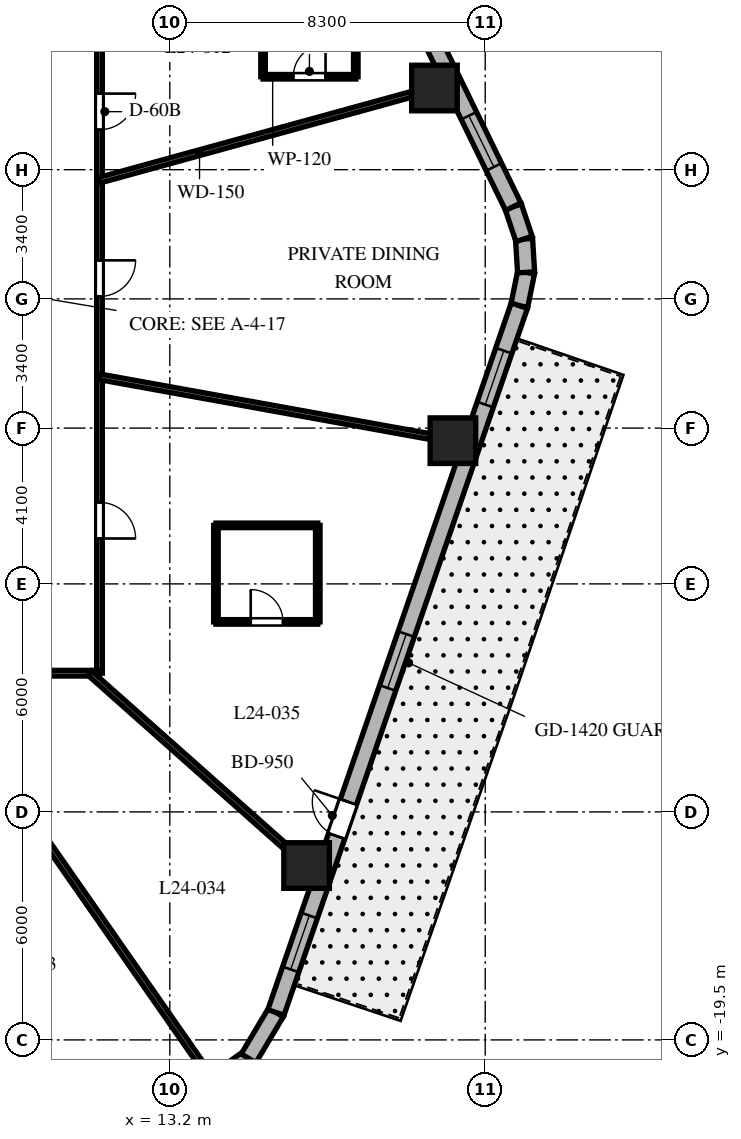
"""IFC4 building model, lengths in metres.
Left out: names, types, materials, properties, quantities, classifications, styles, units other than length and angle.
Written with IfcOpenShell. Run it as: python <this file> out.ifc"""

import sys

from ifc_helpers import new_model, si_unit, direction, frame, frame_2d, origin, origin_2d, place, context, subcontext, project, spatial, rectangle, extrude, element, fill, save


model = new_model("IFC4")
c1 = context("Model", 3, precision=1e-05, world=origin(), true_north=direction((0.0, 1.0)))
c2 = subcontext(c1, "Body", "Model", "MODEL_VIEW")
j1 = project(units=[si_unit("LENGTHUNIT", "METRE"), si_unit("PLANEANGLEUNIT", "RADIAN")], contexts=[c1])
p1 = place(None, origin())
s1 = spatial("IfcSite", under=j1, at=p1, CompositionType="ELEMENT")
p2 = place(p1, origin())
s2 = spatial("IfcBuilding", under=s1, at=p2, CompositionType="ELEMENT")
p3 = place(p2, frame((0.0, 0.0, 102.5)))
s3 = spatial("IfcBuildingStorey", under=s2, at=p3, CompositionType="ELEMENT", Elevation=102.5)
for number, where, z_axis, x_axis in (
    (1, (16.8, -14.911, 0.0), (0.0, 0.0, 1.0), (1.0, 0.0, 0.0)),
    (2, (20.65, -3.731, 0.0), (0.0, 0.0, 1.0), (1.0, 0.0, 0.0)),
    (3, (20.164, 5.549, 0.0), (0.0, 0.0, 1.0), (1.0, 0.0, 0.0)),
):
    element("IfcColumn", number, at=place(p3, frame(where, z_axis=z_axis, x_axis=x_axis)), inside=s3, PredefinedType="COLUMN", context=c2, shape_type="SweptSolid", body=[
        extrude(rectangle(XDim=1.2, YDim=1.2, at=origin_2d()), origin(), (0.0, 0.0, 1.0), 3.7),
    ])
p4 = place(p3, frame((14.146, -20.787, 0.0), z_axis=(0.0, 0.0, 1.0), x_axis=(0.814162929117, 0.580636482536, 0.0)))
e4 = element("IfcWall", 4, at=p4, inside=s3, PredefinedType="SOLIDWALL", context=c2, shape_type="SweptSolid", body=[
    extrude(rectangle(XDim=1.382, YDim=0.45, at=frame_2d((0.691, 0.0))), origin(), (0.0, 0.0, 1.0), 3.4),
])
p5 = place(p3, frame((15.272, -19.984, 0.0), z_axis=(0.0, 0.0, 1.0), x_axis=(0.512579347361, 0.858639862025, 0.0)))
e5 = element("IfcWall", 5, at=p5, inside=s3, PredefinedType="SOLIDWALL", context=c2, shape_type="SweptSolid", body=[
    extrude(rectangle(XDim=1.406, YDim=0.45, at=frame_2d((0.703, 0.0))), origin(), (0.0, 0.0, 1.0), 3.4),
])
p6 = place(p3, frame((22.397, -0.179, 0.0), z_axis=(0.0, 0.0, 1.0), x_axis=(0.199313589404, 0.979935759669, 0.0)))
e6 = element("IfcWall", 6, at=p6, inside=s3, PredefinedType="SOLIDWALL", context=c2, shape_type="SweptSolid", body=[
    extrude(rectangle(XDim=0.896, YDim=0.45, at=frame_2d((0.448, 0.0))), origin(), (0.0, 0.0, 1.0), 3.4),
])
p7 = place(p3, frame((22.575, 0.698, 0.0), z_axis=(0.0, 0.0, 1.0), x_axis=(-0.060980441946, 0.998138961117, 0.0)))
e7 = element("IfcWall", 7, at=p7, inside=s3, PredefinedType="SOLIDWALL", context=c2, shape_type="SweptSolid", body=[
    extrude(rectangle(XDim=0.881, YDim=0.45, at=frame_2d((0.44, 0.0))), origin(), (0.0, 0.0, 1.0), 3.4),
])
p8 = place(p3, frame((22.522, 1.577, 0.0), z_axis=(0.0, 0.0, 1.0), x_axis=(-0.317372694837, 0.948300887151, 0.0)))
e8 = element("IfcWall", 8, at=p8, inside=s3, PredefinedType="SOLIDWALL", context=c2, shape_type="SweptSolid", body=[
    extrude(rectangle(XDim=0.896, YDim=0.45, at=frame_2d((0.448, 0.0))), origin(), (0.0, 0.0, 1.0), 3.4),
])
p9 = place(p3, frame((15.992, -18.777, 0.0), z_axis=(0.0, 0.0, 1.0), x_axis=(0.325606988926, 0.945505202927, 0.0)))
e9 = element("IfcWall", 9, at=p9, inside=s3, PredefinedType="SOLIDWALL", context=c2, shape_type="SweptSolid", body=[
    extrude(rectangle(XDim=19.669, YDim=0.45, at=frame_2d((9.835, 0.0))), origin(), (0.0, 0.0, 1.0), 3.4),
])
p10 = place(p9, frame((4.909, 0.0, 0.0)))
e10 = element("IfcOpeningElement", 10, at=p10, cuts=e9, PredefinedType="OPENING", context=c2, shape_type="SweptSolid", body=[
    extrude(rectangle(XDim=0.95, YDim=2.15, at=frame_2d((0.475, 1.075))), frame((0.0, 0.235, 0.0), z_axis=(0.0, -1.0, 0.0), x_axis=(1.0, 0.0, 0.0)), (0.0, 0.0, 1.0), 0.47),
])
p11 = place(p9, frame((1.197, 0.0, 0.8)))
e11 = element("IfcOpeningElement", 11, at=p11, cuts=e9, PredefinedType="OPENING", context=c2, shape_type="SweptSolid", body=[
    extrude(rectangle(XDim=1.5, YDim=1.8, at=frame_2d((0.75, 0.9))), frame((0.0, 0.235, 0.0), z_axis=(0.0, -1.0, 0.0), x_axis=(1.0, 0.0, 0.0)), (0.0, 0.0, 1.0), 0.47),
])
p12 = place(p9, frame((9.03, 0.0, 0.8)))
e12 = element("IfcOpeningElement", 12, at=p12, cuts=e9, PredefinedType="OPENING", context=c2, shape_type="SweptSolid", body=[
    extrude(rectangle(XDim=1.5, YDim=1.8, at=frame_2d((0.75, 0.9))), frame((0.0, 0.235, 0.0), z_axis=(0.0, -1.0, 0.0), x_axis=(1.0, 0.0, 0.0)), (0.0, 0.0, 1.0), 0.47),
])
p13 = place(p9, frame((16.918, 0.0, 0.8)))
e13 = element("IfcOpeningElement", 13, at=p13, cuts=e9, PredefinedType="OPENING", context=c2, shape_type="SweptSolid", body=[
    extrude(rectangle(XDim=1.5, YDim=1.8, at=frame_2d((0.75, 0.9))), frame((0.0, 0.235, 0.0), z_axis=(0.0, -1.0, 0.0), x_axis=(1.0, 0.0, 0.0)), (0.0, 0.0, 1.0), 0.47),
])
p14 = place(p3, frame((22.238, 2.427, 0.0), z_axis=(0.0, 0.0, 1.0), x_axis=(-0.438374803278, 0.898792262901, 0.0)))
e14 = element("IfcWall", 14, at=p14, inside=s3, PredefinedType="SOLIDWALL", context=c2, shape_type="SweptSolid", body=[
    extrude(rectangle(XDim=18.618, YDim=0.45, at=frame_2d((9.309, 0.0))), origin(), (0.0, 0.0, 1.0), 3.4),
])
p15 = place(p14, frame((5.926, 0.0, 0.8)))
e15 = element("IfcOpeningElement", 15, at=p15, cuts=e14, PredefinedType="OPENING", context=c2, shape_type="SweptSolid", body=[
    extrude(rectangle(XDim=1.5, YDim=1.8, at=frame_2d((0.75, 0.9))), frame((0.0, 0.235, 0.0), z_axis=(0.0, -1.0, 0.0), x_axis=(1.0, 0.0, 0.0)), (0.0, 0.0, 1.0), 0.47),
])
p16 = place(p14, frame((11.165, 0.0, 0.8)))
e16 = element("IfcOpeningElement", 16, at=p16, cuts=e14, PredefinedType="OPENING", context=c2, shape_type="SweptSolid", body=[
    extrude(rectangle(XDim=1.5, YDim=1.8, at=frame_2d((0.75, 0.9))), frame((0.0, 0.235, 0.0), z_axis=(0.0, -1.0, 0.0), x_axis=(1.0, 0.0, 0.0)), (0.0, 0.0, 1.0), 0.47),
])
p17 = place(p14, frame((16.006, 0.0, 0.8)))
e17 = element("IfcOpeningElement", 17, at=p17, cuts=e14, PredefinedType="OPENING", context=c2, shape_type="SweptSolid", body=[
    extrude(rectangle(XDim=1.5, YDim=1.8, at=frame_2d((0.75, 0.9))), frame((0.0, 0.235, 0.0), z_axis=(0.0, -1.0, 0.0), x_axis=(1.0, 0.0, 0.0)), (0.0, 0.0, 1.0), 0.47),
])
p18 = place(p14, frame((1.163, 0.0, 0.8)))
e18 = element("IfcOpeningElement", 18, at=p18, cuts=e14, PredefinedType="OPENING", context=c2, shape_type="SweptSolid", body=[
    extrude(rectangle(XDim=1.5, YDim=1.8, at=frame_2d((0.75, 0.9))), frame((0.0, 0.235, 0.0), z_axis=(0.0, -1.0, 0.0), x_axis=(1.0, 0.0, 0.0)), (0.0, 0.0, 1.0), 0.47),
])
p19 = place(p3, frame((11.35, 9.85, 0.0), z_axis=(0.0, 0.0, 1.0), x_axis=(0.0, -1.0, 0.0)))
e19 = element("IfcWall", 19, at=p19, inside=s3, PredefinedType="PARTITIONING", context=c2, shape_type="SweptSolid", body=[
    extrude(rectangle(XDim=19.7, YDim=0.15, at=frame_2d((9.85, 0.0))), origin(), (0.0, 0.0, 1.0), 2.84),
])
p20 = place(p19, frame((4.448, 0.0, 0.0)))
e20 = element("IfcOpeningElement", 20, at=p20, cuts=e19, PredefinedType="OPENING", context=c2, shape_type="SweptSolid", body=[
    extrude(rectangle(XDim=0.95, YDim=2.03, at=frame_2d((0.475, 1.015))), frame((0.0, 0.085, 0.0), z_axis=(0.0, -1.0, 0.0), x_axis=(1.0, 0.0, 0.0)), (0.0, 0.0, 1.0), 0.17),
])
p21 = place(p19, frame((1.249, 0.0, 0.0)))
e21 = element("IfcOpeningElement", 21, at=p21, cuts=e19, PredefinedType="OPENING", context=c2, shape_type="SweptSolid", body=[
    extrude(rectangle(XDim=0.9, YDim=2.03, at=frame_2d((0.45, 1.015))), frame((0.0, 0.085, 0.0), z_axis=(0.0, -1.0, 0.0), x_axis=(1.0, 0.0, 0.0)), (0.0, 0.0, 1.0), 0.17),
])
p22 = place(p19, frame((15.205, 0.0, 0.0)))
e22 = element("IfcOpeningElement", 22, at=p22, cuts=e19, PredefinedType="OPENING", context=c2, shape_type="SweptSolid", body=[
    extrude(rectangle(XDim=0.95, YDim=2.03, at=frame_2d((0.475, 1.015))), frame((0.0, 0.085, 0.0), z_axis=(0.0, -1.0, 0.0), x_axis=(1.0, 0.0, 0.0)), (0.0, 0.0, 1.0), 0.17),
])
p23 = place(p19, frame((8.836, 0.0, 0.0)))
e23 = element("IfcOpeningElement", 23, at=p23, cuts=e19, PredefinedType="OPENING", context=c2, shape_type="SweptSolid", body=[
    extrude(rectangle(XDim=0.95, YDim=2.03, at=frame_2d((0.475, 1.015))), frame((0.0, 0.085, 0.0), z_axis=(0.0, -1.0, 0.0), x_axis=(1.0, 0.0, 0.0)), (0.0, 0.0, 1.0), 0.17),
])
p24 = place(p3, frame((11.35, -9.85, 0.0), z_axis=(0.0, 0.0, 1.0), x_axis=(-1.0, 0.0, 0.0)))
e24 = element("IfcWall", 24, at=p24, inside=s3, PredefinedType="PARTITIONING", context=c2, shape_type="SweptSolid", body=[
    extrude(rectangle(XDim=22.7, YDim=0.15, at=frame_2d((11.35, 0.0))), origin(), (0.0, 0.0, 1.0), 2.84),
])
p25 = place(p24, frame((17.237, 0.0, 0.0)))
e25 = element("IfcOpeningElement", 25, at=p25, cuts=e24, PredefinedType="OPENING", context=c2, shape_type="SweptSolid", body=[
    extrude(rectangle(XDim=0.95, YDim=2.03, at=frame_2d((0.475, 1.015))), frame((0.0, 0.085, 0.0), z_axis=(0.0, -1.0, 0.0), x_axis=(1.0, 0.0, 0.0)), (0.0, 0.0, 1.0), 0.17),
])
p26 = place(p24, frame((12.39, 0.0, 0.0)))
e26 = element("IfcOpeningElement", 26, at=p26, cuts=e24, PredefinedType="OPENING", context=c2, shape_type="SweptSolid", body=[
    extrude(rectangle(XDim=0.95, YDim=2.03, at=frame_2d((0.475, 1.015))), frame((0.0, 0.085, 0.0), z_axis=(0.0, -1.0, 0.0), x_axis=(1.0, 0.0, 0.0)), (0.0, 0.0, 1.0), 0.17),
])
p27 = place(p24, frame((8.954, 0.0, 0.0)))
e27 = element("IfcOpeningElement", 27, at=p27, cuts=e24, PredefinedType="OPENING", context=c2, shape_type="SweptSolid", body=[
    extrude(rectangle(XDim=0.95, YDim=2.03, at=frame_2d((0.475, 1.015))), frame((0.0, 0.085, 0.0), z_axis=(0.0, -1.0, 0.0), x_axis=(1.0, 0.0, 0.0)), (0.0, 0.0, 1.0), 0.17),
])
p28 = place(p24, frame((5.522, 0.0, 0.0)))
e28 = element("IfcOpeningElement", 28, at=p28, cuts=e24, PredefinedType="OPENING", context=c2, shape_type="SweptSolid", body=[
    extrude(rectangle(XDim=0.9, YDim=2.03, at=frame_2d((0.45, 1.015))), frame((0.0, 0.085, 0.0), z_axis=(0.0, -1.0, 0.0), x_axis=(1.0, 0.0, 0.0)), (0.0, 0.0, 1.0), 0.17),
])
p29 = place(p24, frame((1.914, 0.0, 0.0)))
e29 = element("IfcOpeningElement", 29, at=p29, cuts=e24, PredefinedType="OPENING", context=c2, shape_type="SweptSolid", body=[
    extrude(rectangle(XDim=0.9, YDim=2.03, at=frame_2d((0.45, 1.015))), frame((0.0, 0.085, 0.0), z_axis=(0.0, -1.0, 0.0), x_axis=(1.0, 0.0, 0.0)), (0.0, 0.0, 1.0), 0.17),
])
p30 = place(p3, frame((11.35, 3.123, 0.0), z_axis=(0.0, 0.0, 1.0), x_axis=(0.964151983214, 0.265350623261, 0.0)))
e30 = element("IfcWall", 30, at=p30, inside=s3, PredefinedType="PARTITIONING", context=c2, shape_type="SweptSolid", body=[
    extrude(rectangle(XDim=9.645, YDim=0.15, at=frame_2d((4.823, 0.0))), origin(), (0.0, 0.0, 1.0), 2.54),
])
p31 = place(p3, frame((6.861, -9.85, 0.0), z_axis=(0.0, 0.0, 1.0), x_axis=(0.571575431292, -0.820549527051, 0.0)))
e31 = element("IfcWall", 31, at=p31, inside=s3, PredefinedType="PARTITIONING", context=c2, shape_type="SweptSolid", body=[
    extrude(rectangle(XDim=12.975, YDim=0.15, at=frame_2d((6.488, 0.0))), origin(), (0.0, 0.0, 1.0), 2.54),
])
p32 = place(p3, frame((11.098, -9.85, 0.0), z_axis=(0.0, 0.0, 1.0), x_axis=(0.747904295103, -0.663806572253, 0.0)))
e32 = element("IfcWall", 32, at=p32, inside=s3, PredefinedType="PARTITIONING", context=c2, shape_type="SweptSolid", body=[
    extrude(rectangle(XDim=8.16, YDim=0.15, at=frame_2d((4.08, 0.0))), origin(), (0.0, 0.0, 1.0), 2.54),
])
p33 = place(p3, frame((11.35, -2.051, 0.0), z_axis=(0.0, 0.0, 1.0), x_axis=(0.984068313063, -0.177790762484, 0.0)))
e33 = element("IfcWall", 33, at=p33, inside=s3, PredefinedType="PARTITIONING", context=c2, shape_type="SweptSolid", body=[
    extrude(rectangle(XDim=9.951, YDim=0.15, at=frame_2d((4.976, 0.0))), origin(), (0.0, 0.0, 1.0), 2.54),
])
p34 = place(p3, frame((15.654, 5.846, 0.0), z_axis=(0.0, 0.0, 1.0), x_axis=(1.0, 0.0, 0.0)))
e34 = element("IfcWall", 34, at=p34, inside=s3, PredefinedType="PARTITIONING", context=c2, shape_type="SweptSolid", body=[
    extrude(rectangle(XDim=2.44, YDim=0.12, at=frame_2d((1.22, 0.0))), origin(), (0.0, 0.0, 1.0), 2.84),
])
p35 = place(p34, frame((0.795, 0.0, 0.0)))
e35 = element("IfcOpeningElement", 35, at=p35, cuts=e34, PredefinedType="OPENING", context=c2, shape_type="SweptSolid", body=[
    extrude(rectangle(XDim=0.85, YDim=2.03, at=frame_2d((0.425, 1.015))), frame((0.0, 0.07, 0.0), z_axis=(0.0, -1.0, 0.0), x_axis=(1.0, 0.0, 0.0)), (0.0, 0.0, 1.0), 0.14),
])
for number, where, z_axis, x_axis in (
    (36, (18.094, 5.846, 0.0), (0.0, 0.0, 1.0), (0.0, 1.0, 0.0)),
    (37, (15.654, 8.456, 0.0), (0.0, 0.0, 1.0), (0.0, -1.0, 0.0)),
):
    element("IfcWall", number, at=place(p3, frame(where, z_axis=z_axis, x_axis=x_axis)), inside=s3, PredefinedType="PARTITIONING", context=c2, shape_type="SweptSolid", body=[
        extrude(rectangle(XDim=2.61, YDim=0.12, at=frame_2d((1.305, 0.0))), origin(), (0.0, 0.0, 1.0), 2.84),
    ])
p36 = place(p3, frame((14.414, -8.5, 0.0), z_axis=(0.0, 0.0, 1.0), x_axis=(1.0, 0.0, 0.0)))
e38 = element("IfcWall", 38, at=p36, inside=s3, PredefinedType="PARTITIONING", context=c2, shape_type="SweptSolid", body=[
    extrude(rectangle(XDim=2.68, YDim=0.12, at=frame_2d((1.34, 0.0))), origin(), (0.0, 0.0, 1.0), 2.972),
])
p37 = place(p36, frame((0.915, 0.0, 0.0)))
e39 = element("IfcOpeningElement", 39, at=p37, cuts=e38, PredefinedType="OPENING", context=c2, shape_type="SweptSolid", body=[
    extrude(rectangle(XDim=0.85, YDim=2.03, at=frame_2d((0.425, 1.015))), frame((0.0, 0.07, 0.0), z_axis=(0.0, -1.0, 0.0), x_axis=(1.0, 0.0, 0.0)), (0.0, 0.0, 1.0), 0.14),
])
p38 = place(p3, frame((17.094, -8.5, 0.0), z_axis=(0.0, 0.0, 1.0), x_axis=(0.0, 1.0, 0.0)))
e40 = element("IfcWall", 40, at=p38, inside=s3, PredefinedType="PARTITIONING", context=c2, shape_type="SweptSolid", body=[
    extrude(rectangle(XDim=2.54, YDim=0.12, at=frame_2d((1.27, 0.0))), origin(), (0.0, 0.0, 1.0), 3.4),
])
p39 = place(p3, frame((17.094, -5.96, 0.0), z_axis=(0.0, 0.0, 1.0), x_axis=(-1.0, 0.0, 0.0)))
e41 = element("IfcWall", 41, at=p39, inside=s3, PredefinedType="PARTITIONING", context=c2, shape_type="SweptSolid", body=[
    extrude(rectangle(XDim=2.68, YDim=0.12, at=frame_2d((1.34, 0.0))), origin(), (0.0, 0.0, 1.0), 2.972),
])
p40 = place(p3, frame((14.414, -5.96, 0.0), z_axis=(0.0, 0.0, 1.0), x_axis=(0.0, -1.0, 0.0)))
e42 = element("IfcWall", 42, at=p40, inside=s3, PredefinedType="PARTITIONING", context=c2, shape_type="SweptSolid", body=[
    extrude(rectangle(XDim=2.54, YDim=0.12, at=frame_2d((1.27, 0.0))), origin(), (0.0, 0.0, 1.0), 3.4),
])
p41 = place(p10, origin())
e43 = element("IfcDoor", 43, at=p41, inside=s3, OperationType="SINGLE_SWING_RIGHT", PredefinedType="DOOR", context=c2, shape_type="SweptSolid", body=[
    extrude(rectangle(XDim=0.95, YDim=2.15, at=frame_2d((0.475, 1.075))), frame((0.0, 0.025, 0.0), z_axis=(0.0, -1.0, 0.0), x_axis=(1.0, 0.0, 0.0)), (0.0, 0.0, 1.0), 0.05),
])
fill(e10, e43)
p42 = place(p11, origin())
e44 = element("IfcWindow", 44, at=p42, inside=s3, PartitioningType="SINGLE_PANEL", PredefinedType="WINDOW", context=c2, shape_type="SweptSolid", body=[
    extrude(rectangle(XDim=1.5, YDim=1.8, at=frame_2d((0.75, 0.9))), frame((0.0, 0.03, 0.0), z_axis=(0.0, -1.0, 0.0), x_axis=(1.0, 0.0, 0.0)), (0.0, 0.0, 1.0), 0.06),
])
fill(e11, e44)
p43 = place(p12, origin())
e45 = element("IfcWindow", 45, at=p43, inside=s3, PartitioningType="SINGLE_PANEL", PredefinedType="WINDOW", context=c2, shape_type="SweptSolid", body=[
    extrude(rectangle(XDim=1.5, YDim=1.8, at=frame_2d((0.75, 0.9))), frame((0.0, 0.03, 0.0), z_axis=(0.0, -1.0, 0.0), x_axis=(1.0, 0.0, 0.0)), (0.0, 0.0, 1.0), 0.06),
])
fill(e12, e45)
p44 = place(p13, origin())
e46 = element("IfcWindow", 46, at=p44, inside=s3, PartitioningType="SINGLE_PANEL", PredefinedType="WINDOW", context=c2, shape_type="SweptSolid", body=[
    extrude(rectangle(XDim=1.5, YDim=1.8, at=frame_2d((0.75, 0.9))), frame((0.0, 0.03, 0.0), z_axis=(0.0, -1.0, 0.0), x_axis=(1.0, 0.0, 0.0)), (0.0, 0.0, 1.0), 0.06),
])
fill(e13, e46)
p45 = place(p18, origin())
e47 = element("IfcWindow", 47, at=p45, inside=s3, PartitioningType="SINGLE_PANEL", PredefinedType="WINDOW", context=c2, shape_type="SweptSolid", body=[
    extrude(rectangle(XDim=1.5, YDim=1.8, at=frame_2d((0.75, 0.9))), frame((0.0, 0.03, 0.0), z_axis=(0.0, -1.0, 0.0), x_axis=(1.0, 0.0, 0.0)), (0.0, 0.0, 1.0), 0.06),
])
fill(e18, e47)
p46 = place(p20, origin())
e48 = element("IfcDoor", 48, at=p46, inside=s3, OperationType="SINGLE_SWING_LEFT", PredefinedType="DOOR", context=c2, shape_type="SweptSolid", body=[
    extrude(rectangle(XDim=0.95, YDim=2.03, at=frame_2d((0.475, 1.015))), frame((0.0, 0.025, 0.0), z_axis=(0.0, -1.0, 0.0), x_axis=(1.0, 0.0, 0.0)), (0.0, 0.0, 1.0), 0.05),
])
fill(e20, e48)
p47 = place(p35, origin())
e49 = element("IfcDoor", 49, at=p47, inside=s3, OperationType="SINGLE_SWING_RIGHT", PredefinedType="DOOR", context=c2, shape_type="SweptSolid", body=[
    extrude(rectangle(XDim=0.85, YDim=2.03, at=frame_2d((0.425, 1.015))), frame((0.0, 0.025, 0.0), z_axis=(0.0, -1.0, 0.0), x_axis=(1.0, 0.0, 0.0)), (0.0, 0.0, 1.0), 0.05),
])
fill(e35, e49)
p48 = place(p22, origin())
e50 = element("IfcDoor", 50, at=p48, inside=s3, OperationType="SINGLE_SWING_RIGHT", PredefinedType="DOOR", context=c2, shape_type="SweptSolid", body=[
    extrude(rectangle(XDim=0.95, YDim=2.03, at=frame_2d((0.475, 1.015))), frame((0.0, 0.025, 0.0), z_axis=(0.0, -1.0, 0.0), x_axis=(1.0, 0.0, 0.0)), (0.0, 0.0, 1.0), 0.05),
])
fill(e22, e50)
p49 = place(p37, origin())
e51 = element("IfcDoor", 51, at=p49, inside=s3, OperationType="SINGLE_SWING_LEFT", PredefinedType="DOOR", context=c2, shape_type="SweptSolid", body=[
    extrude(rectangle(XDim=0.85, YDim=2.03, at=frame_2d((0.425, 1.015))), frame((0.0, 0.025, 0.0), z_axis=(0.0, -1.0, 0.0), x_axis=(1.0, 0.0, 0.0)), (0.0, 0.0, 1.0), 0.05),
])
fill(e39, e51)
p50 = place(p23, origin())
e52 = element("IfcDoor", 52, at=p50, inside=s3, OperationType="SINGLE_SWING_LEFT", PredefinedType="DOOR", context=c2, shape_type="SweptSolid", body=[
    extrude(rectangle(XDim=0.95, YDim=2.03, at=frame_2d((0.475, 1.015))), frame((0.0, 0.025, 0.0), z_axis=(0.0, -1.0, 0.0), x_axis=(1.0, 0.0, 0.0)), (0.0, 0.0, 1.0), 0.05),
])
fill(e23, e52)
save(model, sys.argv[1])
